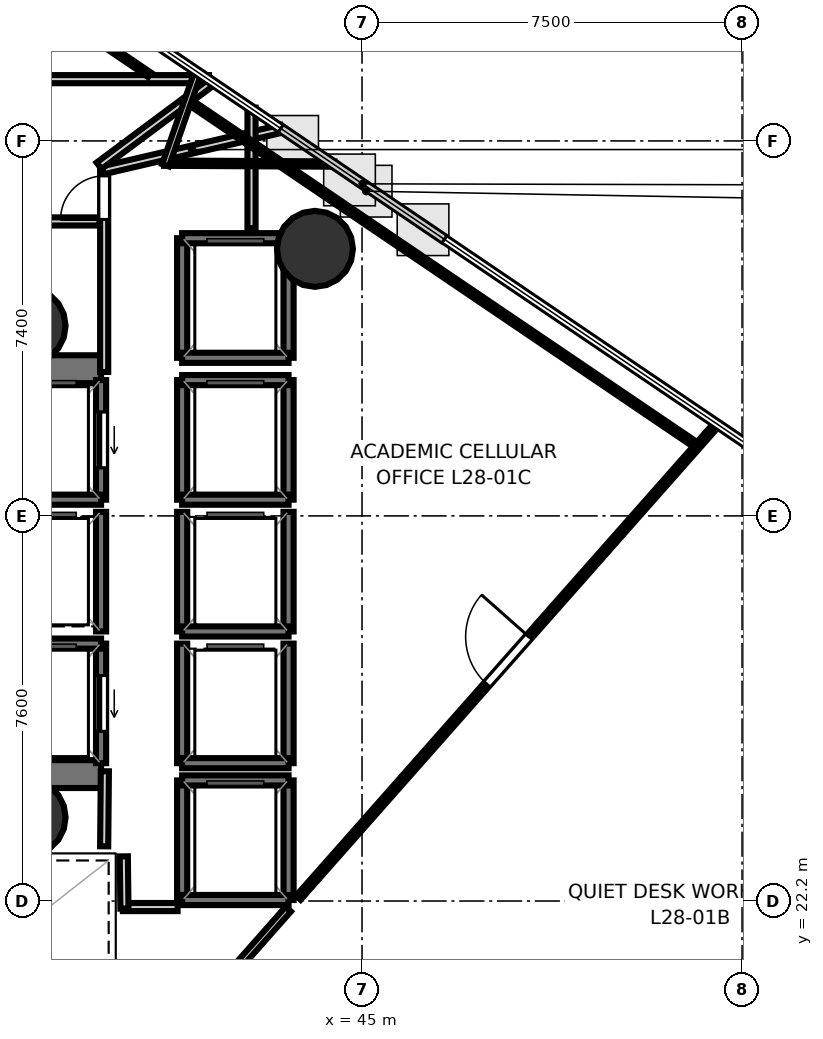
"""IFC4 building model, lengths in metres.
Left out: names, types, materials, properties, quantities, classifications, styles, units other than length and angle.
Written with IfcOpenShell. Run it as: python <this file> out.ifc"""

import sys

from ifc_helpers import new_model, si_unit, direction, frame, frame_2d, origin, origin_2d, place, context, subcontext, project, spatial, rectangle, hollow_circle, extrude, element, fill, save


model = new_model("IFC4")
c1 = context("Model", 3, precision=1e-05, world=origin(), true_north=direction((0.0, 1.0)))
c2 = subcontext(c1, "Body", "Model", "MODEL_VIEW")
j1 = project(units=[si_unit("LENGTHUNIT", "METRE"), si_unit("PLANEANGLEUNIT", "RADIAN")], contexts=[c1])
p1 = place(None, origin())
s1 = spatial("IfcSite", under=j1, at=p1, CompositionType="ELEMENT")
p2 = place(p1, origin())
s2 = spatial("IfcBuilding", under=s1, at=p2, CompositionType="ELEMENT")
p3 = place(p2, frame((0.0, 0.0, 112.6)))
s3 = spatial("IfcBuildingStorey", under=s2, at=p3, CompositionType="ELEMENT", Elevation=112.6)
p4 = place(p3, frame((29.23, 32.695, 0.0), z_axis=(0.0, 0.0, 1.0), x_axis=(1.0, 0.0, 0.0)))
e1 = element("IfcWall", 1, at=p4, inside=s3, PredefinedType="SHEAR", context=c2, shape_type="SweptSolid", body=[
    extrude(rectangle(XDim=10.62, YDim=0.55, at=frame_2d((5.31, 0.0))), origin(), (0.0, 0.0, 1.0), 3.52),
])
p5 = place(p4, frame((0.995, 0.0, 0.0)))
e2 = element("IfcOpeningElement", 2, at=p5, cuts=e1, PredefinedType="OPENING", context=c2, shape_type="SweptSolid", body=[
    extrude(rectangle(XDim=1.25, YDim=2.15, at=frame_2d((0.625, 1.075))), frame((0.0, 0.285, 0.0), z_axis=(0.0, -1.0, 0.0), x_axis=(1.0, 0.0, 0.0)), (0.0, 0.0, 1.0), 0.57),
])
p6 = place(p3, frame((29.23, 24.705, 0.0), z_axis=(0.0, 0.0, 1.0), x_axis=(1.0, 0.0, 0.0)))
e3 = element("IfcWall", 3, at=p6, inside=s3, PredefinedType="SHEAR", context=c2, shape_type="SweptSolid", body=[
    extrude(rectangle(XDim=10.62, YDim=0.55, at=frame_2d((5.31, 0.0))), origin(), (0.0, 0.0, 1.0), 3.52),
])
p7 = place(p6, frame((0.795, 0.0, 0.0)))
e4 = element("IfcOpeningElement", 4, at=p7, cuts=e3, PredefinedType="OPENING", context=c2, shape_type="SweptSolid", body=[
    extrude(rectangle(XDim=1.25, YDim=2.15, at=frame_2d((0.625, 1.075))), frame((0.0, 0.285, 0.0), z_axis=(0.0, -1.0, 0.0), x_axis=(1.0, 0.0, 0.0)), (0.0, 0.0, 1.0), 0.57),
])
for number, where, z_axis, x_axis in (
    (5, (38.4, 33.55, 0.0), (0.0, 0.0, 1.0), (1.0, 0.0, 0.0)),
    (6, (38.4, 23.85, 0.0), (0.0, 0.0, 1.0), (1.0, 0.0, 0.0)),
    (7, (44.071, 35.07, 0.0), (0.0, 0.0, 1.0), (1.0, 0.0, 0.0)),
):
    element("IfcColumn", number, at=place(p3, frame(where, z_axis=z_axis, x_axis=x_axis)), inside=s3, PredefinedType="COLUMN", context=c2, shape_type="SweptSolid", body=[
        extrude(hollow_circle(Radius=0.75, WallThickness=0.036, at=origin_2d()), origin(), (0.0, 0.0, 1.0), 3.7),
    ])
p8 = place(p3, frame((39.85, 30.12, 0.0), z_axis=(0.0, 0.0, 1.0), x_axis=(0.0, 1.0, 0.0)))
e8 = element("IfcWall", 8, at=p8, inside=s3, PredefinedType="SOLIDWALL", context=c2, shape_type="SweptSolid", body=[
    extrude(rectangle(XDim=2.36, YDim=0.2, at=frame_2d((1.18, 0.0))), origin(), (0.0, 0.0, 1.0), 3.52),
])
p9 = place(p8, frame((0.63, 0.0, 0.0)))
e9 = element("IfcOpeningElement", 9, at=p9, cuts=e8, PredefinedType="OPENING", context=c2, shape_type="SweptSolid", body=[
    extrude(rectangle(XDim=1.1, YDim=2.15, at=frame_2d((0.55, 1.075))), frame((0.0, 0.11, 0.0), z_axis=(0.0, -1.0, 0.0), x_axis=(1.0, 0.0, 0.0)), (0.0, 0.0, 1.0), 0.22),
])
p10 = place(p3, frame((37.75, 30.12, 0.0), z_axis=(0.0, 0.0, 1.0), x_axis=(1.0, 0.0, 0.0)))
e10 = element("IfcWall", 10, at=p10, inside=s3, PredefinedType="SOLIDWALL", context=c2, shape_type="SweptSolid", body=[
    extrude(rectangle(XDim=2.1, YDim=0.2, at=frame_2d((1.05, 0.0))), origin(), (0.0, 0.0, 1.0), 3.52),
])
p11 = place(p3, frame((39.85, 24.92, 0.0), z_axis=(0.0, 0.0, 1.0), x_axis=(0.0, 1.0, 0.0)))
e11 = element("IfcWall", 11, at=p11, inside=s3, PredefinedType="SOLIDWALL", context=c2, shape_type="SweptSolid", body=[
    extrude(rectangle(XDim=2.36, YDim=0.2, at=frame_2d((1.18, 0.0))), origin(), (0.0, 0.0, 1.0), 3.52),
])
p12 = place(p11, frame((0.63, 0.0, 0.0)))
e12 = element("IfcOpeningElement", 12, at=p12, cuts=e11, PredefinedType="OPENING", context=c2, shape_type="SweptSolid", body=[
    extrude(rectangle(XDim=1.1, YDim=2.15, at=frame_2d((0.55, 1.075))), frame((0.0, 0.11, 0.0), z_axis=(0.0, -1.0, 0.0), x_axis=(1.0, 0.0, 0.0)), (0.0, 0.0, 1.0), 0.22),
])
p13 = place(p3, frame((37.75, 27.28, 0.0), z_axis=(0.0, 0.0, 1.0), x_axis=(1.0, 0.0, 0.0)))
e13 = element("IfcWall", 13, at=p13, inside=s3, PredefinedType="SOLIDWALL", context=c2, shape_type="SweptSolid", body=[
    extrude(rectangle(XDim=2.1, YDim=0.2, at=frame_2d((1.05, 0.0))), origin(), (0.0, 0.0, 1.0), 3.52),
])
for number, where, z_axis, x_axis in (
    (14, (43.55, 30.12, 0.0), (0.0, 0.0, 1.0), (0.0, 1.0, 0.0)),
    (15, (41.45, 30.12, 0.0), (0.0, 0.0, 1.0), (0.0, 1.0, 0.0)),
):
    element("IfcWall", number, at=place(p3, frame(where, z_axis=z_axis, x_axis=x_axis)), inside=s3, PredefinedType="SOLIDWALL", context=c2, shape_type="SweptSolid", body=[
        extrude(rectangle(XDim=2.36, YDim=0.2, at=frame_2d((1.18, 0.0))), origin(), (0.0, 0.0, 1.0), 3.52),
    ])
for number, where, z_axis, x_axis in (
    (16, (41.45, 32.48, 0.0), (0.0, 0.0, 1.0), (1.0, 0.0, 0.0)),
    (17, (41.45, 30.12, 0.0), (0.0, 0.0, 1.0), (1.0, 0.0, 0.0)),
):
    element("IfcWall", number, at=place(p3, frame(where, z_axis=z_axis, x_axis=x_axis)), inside=s3, PredefinedType="SOLIDWALL", context=c2, shape_type="SweptSolid", body=[
        extrude(rectangle(XDim=2.1, YDim=0.2, at=frame_2d((1.05, 0.0))), origin(), (0.0, 0.0, 1.0), 3.52),
    ])
for number, where, z_axis, x_axis in (
    (18, (43.55, 27.52, 0.0), (0.0, 0.0, 1.0), (0.0, 1.0, 0.0)),
    (19, (41.45, 27.52, 0.0), (0.0, 0.0, 1.0), (0.0, 1.0, 0.0)),
):
    element("IfcWall", number, at=place(p3, frame(where, z_axis=z_axis, x_axis=x_axis)), inside=s3, PredefinedType="SOLIDWALL", context=c2, shape_type="SweptSolid", body=[
        extrude(rectangle(XDim=2.36, YDim=0.2, at=frame_2d((1.18, 0.0))), origin(), (0.0, 0.0, 1.0), 3.52),
    ])
p14 = place(p3, frame((41.45, 27.52, 0.0), z_axis=(0.0, 0.0, 1.0), x_axis=(1.0, 0.0, 0.0)))
e20 = element("IfcWall", 20, at=p14, inside=s3, PredefinedType="SOLIDWALL", context=c2, shape_type="SweptSolid", body=[
    extrude(rectangle(XDim=2.1, YDim=0.2, at=frame_2d((1.05, 0.0))), origin(), (0.0, 0.0, 1.0), 3.52),
])
for number, where, z_axis, x_axis in (
    (21, (43.55, 24.92, 0.0), (0.0, 0.0, 1.0), (0.0, 1.0, 0.0)),
    (22, (41.45, 24.92, 0.0), (0.0, 0.0, 1.0), (0.0, 1.0, 0.0)),
):
    element("IfcWall", number, at=place(p3, frame(where, z_axis=z_axis, x_axis=x_axis)), inside=s3, PredefinedType="SOLIDWALL", context=c2, shape_type="SweptSolid", body=[
        extrude(rectangle(XDim=2.36, YDim=0.2, at=frame_2d((1.18, 0.0))), origin(), (0.0, 0.0, 1.0), 3.52),
    ])
p15 = place(p3, frame((41.45, 24.92, 0.0), z_axis=(0.0, 0.0, 1.0), x_axis=(1.0, 0.0, 0.0)))
e23 = element("IfcWall", 23, at=p15, inside=s3, PredefinedType="SOLIDWALL", context=c2, shape_type="SweptSolid", body=[
    extrude(rectangle(XDim=2.1, YDim=0.2, at=frame_2d((1.05, 0.0))), origin(), (0.0, 0.0, 1.0), 3.52),
])
p16 = place(p3, frame((39.85, 27.52, 0.0), z_axis=(0.0, 0.0, 1.0), x_axis=(0.0, 1.0, 0.0)))
e24 = element("IfcWall", 24, at=p16, inside=s3, PredefinedType="SOLIDWALL", context=c2, shape_type="SweptSolid", body=[
    extrude(rectangle(XDim=2.36, YDim=0.2, at=frame_2d((1.18, 0.0))), origin(), (0.0, 0.0, 1.0), 3.52),
])
for number, where, z_axis, x_axis in (
    (25, (43.55, 22.22, 0.0), (0.0, 0.0, 1.0), (0.0, 1.0, 0.0)),
    (26, (41.45, 22.22, 0.0), (0.0, 0.0, 1.0), (0.0, 1.0, 0.0)),
):
    element("IfcWall", number, at=place(p3, frame(where, z_axis=z_axis, x_axis=x_axis)), inside=s3, PredefinedType="SOLIDWALL", context=c2, shape_type="SweptSolid", body=[
        extrude(rectangle(XDim=2.36, YDim=0.2, at=frame_2d((1.18, 0.0))), origin(), (0.0, 0.0, 1.0), 3.52),
    ])
for number, where, z_axis, x_axis in (
    (27, (41.45, 24.58, 0.0), (0.0, 0.0, 1.0), (1.0, 0.0, 0.0)),
    (28, (41.45, 22.22, 0.0), (0.0, 0.0, 1.0), (1.0, 0.0, 0.0)),
):
    element("IfcWall", number, at=place(p3, frame(where, z_axis=z_axis, x_axis=x_axis)), inside=s3, PredefinedType="SOLIDWALL", context=c2, shape_type="SweptSolid", body=[
        extrude(rectangle(XDim=2.1, YDim=0.2, at=frame_2d((1.05, 0.0))), origin(), (0.0, 0.0, 1.0), 3.52),
    ])
for number, where, z_axis, x_axis in (
    (29, (43.55, 32.92, 0.0), (0.0, 0.0, 1.0), (0.0, 1.0, 0.0)),
    (30, (41.45, 32.92, 0.0), (0.0, 0.0, 1.0), (0.0, 1.0, 0.0)),
):
    element("IfcWall", number, at=place(p3, frame(where, z_axis=z_axis, x_axis=x_axis)), inside=s3, PredefinedType="SOLIDWALL", context=c2, shape_type="SweptSolid", body=[
        extrude(rectangle(XDim=2.36, YDim=0.2, at=frame_2d((1.18, 0.0))), origin(), (0.0, 0.0, 1.0), 3.52),
    ])
for number, where, z_axis, x_axis in (
    (31, (41.45, 35.28, 0.0), (0.0, 0.0, 1.0), (1.0, 0.0, 0.0)),
    (32, (41.45, 32.92, 0.0), (0.0, 0.0, 1.0), (1.0, 0.0, 0.0)),
):
    element("IfcWall", number, at=place(p3, frame(where, z_axis=z_axis, x_axis=x_axis)), inside=s3, PredefinedType="SOLIDWALL", context=c2, shape_type="SweptSolid", body=[
        extrude(rectangle(XDim=2.1, YDim=0.2, at=frame_2d((1.05, 0.0))), origin(), (0.0, 0.0, 1.0), 3.52),
    ])
p17 = place(p3, frame((39.911, 32.64, 0.0), z_axis=(0.0, 0.0, 1.0), x_axis=(0.0, 1.0, 0.0)))
e33 = element("IfcWall", 33, at=p17, inside=s3, PredefinedType="PARTITIONING", context=c2, shape_type="SweptSolid", body=[
    extrude(rectangle(XDim=4.01, YDim=0.16, at=frame_2d((2.005, 0.0))), origin(), (0.0, 0.0, 1.0), 2.84),
])
p18 = place(p17, frame((3.01, 0.0, 0.0)))
e34 = element("IfcOpeningElement", 34, at=p18, cuts=e33, PredefinedType="OPENING", context=c2, shape_type="SweptSolid", body=[
    extrude(rectangle(XDim=0.86, YDim=2.05, at=frame_2d((0.43, 1.025))), frame((0.0, 0.09, 0.0), z_axis=(0.0, -1.0, 0.0), x_axis=(1.0, 0.0, 0.0)), (0.0, 0.0, 1.0), 0.18),
])
p19 = place(p3, frame((39.88, 36.619, 0.0), z_axis=(0.0, 0.0, 1.0), x_axis=(0.973960950435, 0.2267158288, 0.0)))
e35 = element("IfcWall", 35, at=p19, inside=s3, PredefinedType="PARTITIONING", context=c2, shape_type="SweptSolid", body=[
    extrude(rectangle(XDim=3.62, YDim=0.16, at=frame_2d((1.81, 0.0))), origin(), (0.0, 0.0, 1.0), 2.84),
])
p20 = place(p3, frame((42.819, 37.857, 0.0), z_axis=(0.0, 0.0, 1.0), x_axis=(0.0, -1.0, 0.0)))
e36 = element("IfcWall", 36, at=p20, inside=s3, PredefinedType="PARTITIONING", context=c2, shape_type="SweptSolid", body=[
    extrude(rectangle(XDim=2.377, YDim=0.16, at=frame_2d((1.188, 0.0))), origin(), (0.0, 0.0, 1.0), 2.84),
])
p21 = place(p3, frame((41.36, 22.081, 0.0), z_axis=(0.0, 0.0, 1.0), x_axis=(-1.0, 0.0, 0.0)))
e37 = element("IfcWall", 37, at=p21, inside=s3, PredefinedType="PARTITIONING", context=c2, shape_type="SweptSolid", body=[
    extrude(rectangle(XDim=1.08, YDim=0.16, at=frame_2d((0.54, 0.0))), origin(), (0.0, 0.0, 1.0), 2.84),
])
p22 = place(p3, frame((40.311, 22.05, 0.0), z_axis=(0.0, 0.0, 1.0), x_axis=(-0.011836292006, 0.999929948642, 0.0)))
e38 = element("IfcWall", 38, at=p22, inside=s3, PredefinedType="PARTITIONING", context=c2, shape_type="SweptSolid", body=[
    extrude(rectangle(XDim=1.031, YDim=0.16, at=frame_2d((0.516, 0.0))), origin(), (0.0, 0.0, 1.0), 2.84),
])
p23 = place(p3, frame((39.911, 23.28, 0.0), z_axis=(0.0, 0.0, 1.0), x_axis=(0.009397771291, 0.999955839972, 0.0)))
e39 = element("IfcWall", 39, at=p23, inside=s3, PredefinedType="PARTITIONING", context=c2, shape_type="SweptSolid", body=[
    extrude(rectangle(XDim=1.481, YDim=0.16, at=frame_2d((0.74, 0.0))), origin(), (0.0, 0.0, 1.0), 2.84),
])
p24 = place(p3, frame((26.42, 38.419, 0.0), z_axis=(0.0, 0.0, 1.0), x_axis=(1.0, 0.0, 0.0)))
e40 = element("IfcWall", 40, at=p24, inside=s3, PredefinedType="PARTITIONING", context=c2, shape_type="SweptSolid", body=[
    extrude(rectangle(XDim=15.56, YDim=0.16, at=frame_2d((7.78, 0.0))), origin(), (0.0, 0.0, 1.0), 2.84),
])
p25 = place(p24, frame((10.865, 0.0, 0.0)))
e41 = element("IfcOpeningElement", 41, at=p25, cuts=e40, PredefinedType="OPENING", context=c2, shape_type="SweptSolid", body=[
    extrude(rectangle(XDim=1.25, YDim=2.2, at=frame_2d((0.625, 1.1))), frame((0.0, 0.09, 0.0), z_axis=(0.0, -1.0, 0.0), x_axis=(1.0, 0.0, 0.0)), (0.0, 0.0, 1.0), 0.18),
])
p26 = place(p24, frame((5.532, 0.0, 0.0)))
e42 = element("IfcOpeningElement", 42, at=p26, cuts=e40, PredefinedType="OPENING", context=c2, shape_type="SweptSolid", body=[
    extrude(rectangle(XDim=1.25, YDim=2.2, at=frame_2d((0.625, 1.1))), frame((0.0, 0.09, 0.0), z_axis=(0.0, -1.0, 0.0), x_axis=(1.0, 0.0, 0.0)), (0.0, 0.0, 1.0), 0.18),
])
p27 = place(p3, frame((42.053, 38.379, 0.0), z_axis=(0.0, 0.0, 1.0), x_axis=(-0.802246834953, -0.596992475504, 0.0)))
e43 = element("IfcWall", 43, at=p27, inside=s3, PredefinedType="PARTITIONING", context=c2, shape_type="SweptSolid", body=[
    extrude(rectangle(XDim=2.796, YDim=0.16, at=frame_2d((1.398, 0.0))), origin(), (0.0, 0.0, 1.0), 2.84),
])
p28 = place(p3, frame((39.818, 35.611, 0.0), z_axis=(0.0, 0.0, 1.0), x_axis=(-1.0, 0.0, 0.0)))
e44 = element("IfcWall", 44, at=p28, inside=s3, PredefinedType="PARTITIONING", context=c2, shape_type="SweptSolid", body=[
    extrude(rectangle(XDim=2.768, YDim=0.16, at=frame_2d((1.384, 0.0))), origin(), (0.0, 0.0, 1.0), 2.84),
])
p29 = place(p3, frame((40.303, 18.372, 0.0), z_axis=(0.0, 0.0, 1.0), x_axis=(0.662221894186, 0.749307789136, 0.0)))
e45 = element("IfcWall", 45, at=p29, inside=s3, PredefinedType="PARTITIONING", context=c2, shape_type="SweptSolid", body=[
    extrude(rectangle(XDim=4.895, YDim=0.14, at=frame_2d((2.447, 0.0))), origin(), (0.0, 0.0, 1.0), 2.84),
])
p30 = place(p3, frame((43.743, 22.264, 0.0), z_axis=(0.0, 0.0, 1.0), x_axis=(0.662202897959, 0.749324577159, 0.0)))
e46 = element("IfcWall", 46, at=p30, inside=s3, PredefinedType="PARTITIONING", context=c2, shape_type="SweptSolid", body=[
    extrude(rectangle(XDim=12.498, YDim=0.12, at=frame_2d((6.249, 0.0))), origin(), (0.0, 0.0, 1.0), 2.84),
])
p31 = place(p30, frame((5.624, 0.0, 0.0)))
e47 = element("IfcOpeningElement", 47, at=p31, cuts=e46, PredefinedType="OPENING", context=c2, shape_type="SweptSolid", body=[
    extrude(rectangle(XDim=1.25, YDim=2.2, at=frame_2d((0.625, 1.1))), frame((0.0, 0.07, 0.0), z_axis=(0.0, -1.0, 0.0), x_axis=(1.0, 0.0, 0.0)), (0.0, 0.0, 1.0), 0.14),
])
p32 = place(p3, frame((44.454, 36.743, 0.0), z_axis=(0.0, 0.0, 1.0), x_axis=(-0.999986322379, 0.005230205958, 0.0)))
e48 = element("IfcWall", 48, at=p32, inside=s3, PredefinedType="PARTITIONING", context=c2, shape_type="SweptSolid", body=[
    extrude(rectangle(XDim=3.361, YDim=0.105, at=frame_2d((1.68, 0.0))), origin(), (0.0, 0.0, 1.0), 2.095),
])
p33 = place(p3, frame((41.122, 36.72, 0.0), z_axis=(0.0, 0.0, 1.0), x_axis=(0.329225111587, 0.944251463277, 0.0)))
e49 = element("IfcWall", 49, at=p33, inside=s3, PredefinedType="PARTITIONING", context=c2, shape_type="SweptSolid", body=[
    extrude(rectangle(XDim=1.962, YDim=0.14, at=frame_2d((0.981, 0.0))), origin(), (0.0, 0.0, 1.0), 2.84),
])
p34 = place(p3, frame((41.65, 37.933, 0.0), z_axis=(0.0, 0.0, 1.0), x_axis=(0.827941747022, -0.560814107827, 0.0)))
e50 = element("IfcWall", 50, at=p34, inside=s3, PredefinedType="PARTITIONING", context=c2, shape_type="SweptSolid", body=[
    extrude(rectangle(XDim=11.895, YDim=0.12, at=frame_2d((5.948, 0.0))), origin(), (0.0, 0.0, 1.0), 2.095),
])
p35 = place(p3, frame((34.052, 43.08, 0.0), z_axis=(0.0, 0.0, 1.0), x_axis=(0.827934826591, -0.560824324471, 0.0)))
e51 = element("IfcWall", 51, at=p35, inside=s3, PredefinedType="PARTITIONING", context=c2, shape_type="SweptSolid", body=[
    extrude(rectangle(XDim=8.158, YDim=0.105, at=frame_2d((4.079, 0.0))), origin(), (0.0, 0.0, 1.0), 2.84),
])
p36 = place(p9, origin())
e52 = element("IfcDoor", 52, at=p36, inside=s3, OperationType="SLIDING_TO_LEFT", PredefinedType="DOOR", context=c2, shape_type="SweptSolid", body=[
    extrude(rectangle(XDim=1.1, YDim=2.15, at=frame_2d((0.55, 1.075))), frame((0.0, 0.025, 0.0), z_axis=(0.0, -1.0, 0.0), x_axis=(1.0, 0.0, 0.0)), (0.0, 0.0, 1.0), 0.05),
])
fill(e9, e52)
p37 = place(p12, origin())
e53 = element("IfcDoor", 53, at=p37, inside=s3, OperationType="SLIDING_TO_LEFT", PredefinedType="DOOR", context=c2, shape_type="SweptSolid", body=[
    extrude(rectangle(XDim=1.1, YDim=2.15, at=frame_2d((0.55, 1.075))), frame((0.0, 0.025, 0.0), z_axis=(0.0, -1.0, 0.0), x_axis=(1.0, 0.0, 0.0)), (0.0, 0.0, 1.0), 0.05),
])
fill(e12, e53)
p38 = place(p18, origin())
e54 = element("IfcDoor", 54, at=p38, inside=s3, OperationType="SINGLE_SWING_LEFT", PredefinedType="DOOR", context=c2, shape_type="SweptSolid", body=[
    extrude(rectangle(XDim=0.86, YDim=2.05, at=frame_2d((0.43, 1.025))), frame((0.0, 0.025, 0.0), z_axis=(0.0, -1.0, 0.0), x_axis=(1.0, 0.0, 0.0)), (0.0, 0.0, 1.0), 0.05),
])
fill(e34, e54)
p39 = place(p31, origin())
e55 = element("IfcDoor", 55, at=p39, inside=s3, OperationType="SINGLE_SWING_RIGHT", PredefinedType="DOOR", context=c2, shape_type="SweptSolid", body=[
    extrude(rectangle(XDim=1.25, YDim=2.2, at=frame_2d((0.625, 1.1))), frame((0.0, 0.025, 0.0), z_axis=(0.0, -1.0, 0.0), x_axis=(1.0, 0.0, 0.0)), (0.0, 0.0, 1.0), 0.05),
])
fill(e47, e55)
save(model, sys.argv[1])
